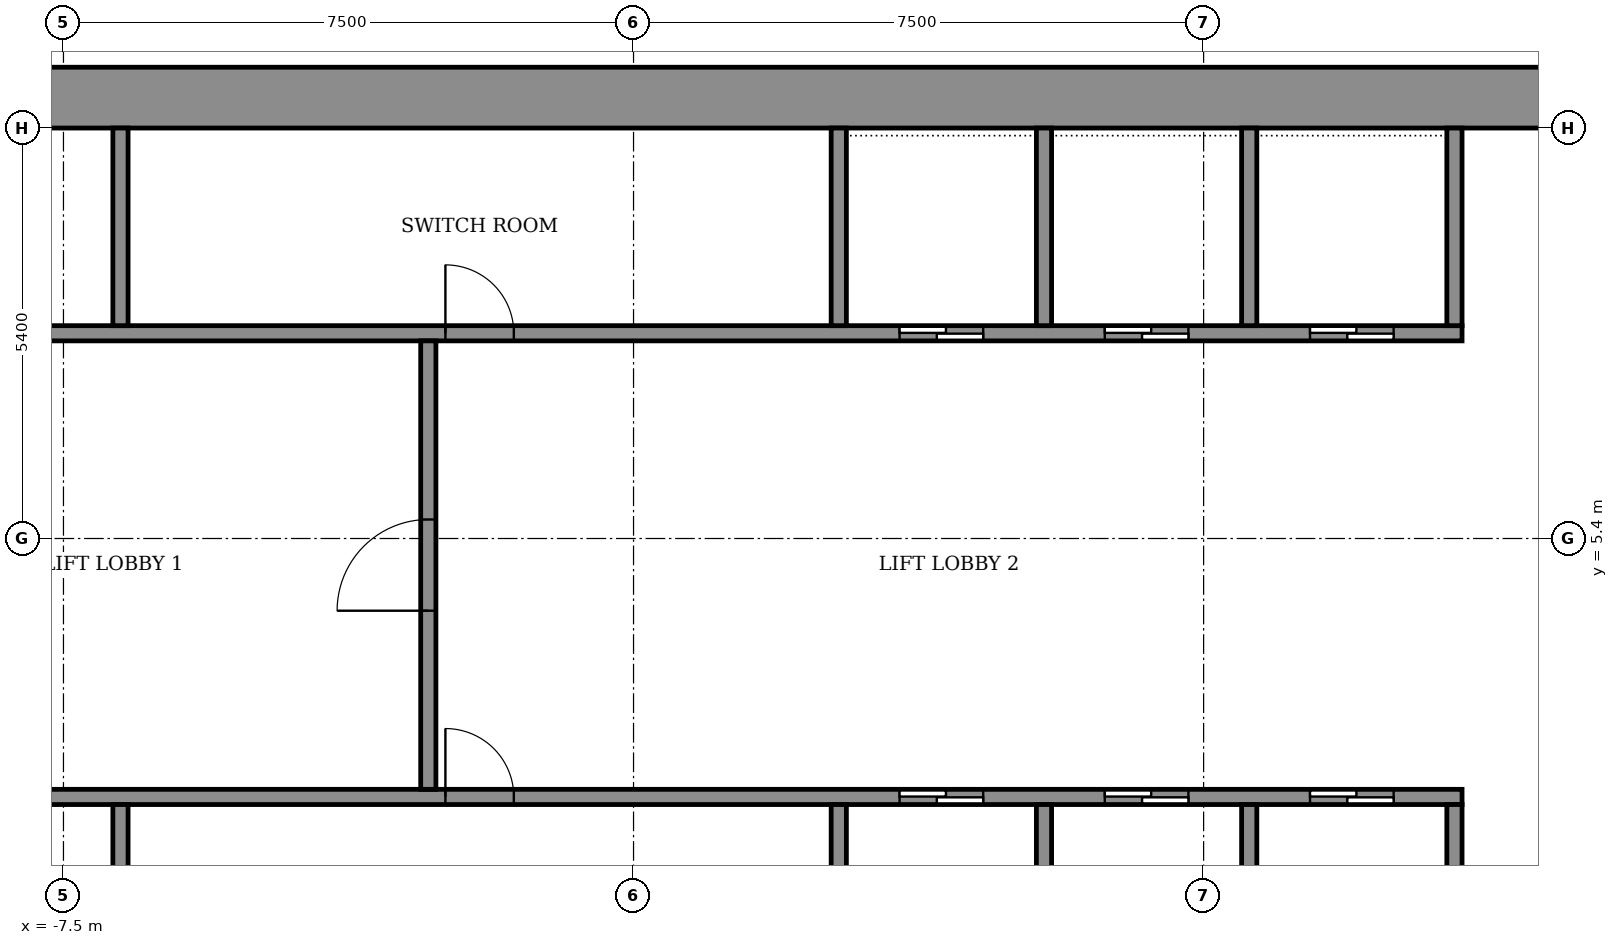
"""IFC4 building model, lengths in metres.
Left out: names, types, materials, properties, quantities, classifications, styles, units other than length and angle.
Written with IfcOpenShell. Run it as: python <this file> out.ifc"""

import sys

from ifc_helpers import new_model, si_unit, direction, frame, frame_2d, origin, place, context, subcontext, project, spatial, rectangle, extrude, element, fill, save


model = new_model("IFC4")
c1 = context("Model", 3, precision=1e-05, world=origin(), true_north=direction((0.0, 1.0)))
c2 = subcontext(c1, "Body", "Model", "MODEL_VIEW")
j1 = project(units=[si_unit("LENGTHUNIT", "METRE"), si_unit("PLANEANGLEUNIT", "RADIAN")], contexts=[c1])
p1 = place(None, origin())
s1 = spatial("IfcSite", under=j1, at=p1, CompositionType="ELEMENT")
p2 = place(p1, origin())
s2 = spatial("IfcBuilding", under=s1, at=p2, CompositionType="ELEMENT")
p3 = place(p2, frame((0.0, 0.0, 205.1)))
s3 = spatial("IfcBuildingStorey", under=s2, at=p3, CompositionType="ELEMENT", Elevation=205.1)
p4 = place(p3, frame((-14.6, 11.2, 0.0), z_axis=(0.0, 0.0, 1.0), x_axis=(1.0, 0.0, 0.0)))
e1 = element("IfcWall", 1, at=p4, inside=s3, PredefinedType="SHEAR", context=c2, shape_type="SweptSolid", body=[
    extrude(rectangle(XDim=29.2, YDim=0.8, at=frame_2d((14.6, 0.0))), origin(), (0.0, 0.0, 1.0), 3.6),
])
p5 = place(p3, frame((-10.9, 2.0, 0.0), z_axis=(0.0, 0.0, 1.0), x_axis=(1.0, 0.0, 0.0)))
e2 = element("IfcWall", 2, at=p5, inside=s3, PredefinedType="SHEAR", context=c2, shape_type="SweptSolid", body=[
    extrude(rectangle(XDim=21.8, YDim=0.2, at=frame_2d((10.9, 0.0))), origin(), (0.0, 0.0, 1.0), 3.05),
])
p6 = place(p5, frame((14.4, 0.0, 0.0)))
e3 = element("IfcOpeningElement", 3, at=p6, cuts=e2, PredefinedType="OPENING", context=c2, shape_type="SweptSolid", body=[
    extrude(rectangle(XDim=1.1, YDim=2.1, at=frame_2d((0.55, 1.05))), frame((0.0, 0.11, 0.0), z_axis=(0.0, -1.0, 0.0), x_axis=(1.0, 0.0, 0.0)), (0.0, 0.0, 1.0), 0.22),
])
p7 = place(p5, frame((17.1, 0.0, 0.0)))
e4 = element("IfcOpeningElement", 4, at=p7, cuts=e2, PredefinedType="OPENING", context=c2, shape_type="SweptSolid", body=[
    extrude(rectangle(XDim=1.1, YDim=2.1, at=frame_2d((0.55, 1.05))), frame((0.0, 0.11, 0.0), z_axis=(0.0, -1.0, 0.0), x_axis=(1.0, 0.0, 0.0)), (0.0, 0.0, 1.0), 0.22),
])
p8 = place(p5, frame((19.8, 0.0, 0.0)))
e5 = element("IfcOpeningElement", 5, at=p8, cuts=e2, PredefinedType="OPENING", context=c2, shape_type="SweptSolid", body=[
    extrude(rectangle(XDim=1.1, YDim=2.1, at=frame_2d((0.55, 1.05))), frame((0.0, 0.11, 0.0), z_axis=(0.0, -1.0, 0.0), x_axis=(1.0, 0.0, 0.0)), (0.0, 0.0, 1.0), 0.22),
])
p9 = place(p5, frame((1.675, 0.0, 0.0)))
e6 = element("IfcOpeningElement", 6, at=p9, cuts=e2, PredefinedType="OPENING", context=c2, shape_type="SweptSolid", body=[
    extrude(rectangle(XDim=0.9, YDim=2.1, at=frame_2d((0.45, 1.05))), frame((0.0, 0.11, 0.0), z_axis=(0.0, -1.0, 0.0), x_axis=(1.0, 0.0, 0.0)), (0.0, 0.0, 1.0), 0.22),
])
p10 = place(p5, frame((8.425, 0.0, 0.0)))
e7 = element("IfcOpeningElement", 7, at=p10, cuts=e2, PredefinedType="OPENING", context=c2, shape_type="SweptSolid", body=[
    extrude(rectangle(XDim=0.9, YDim=2.1, at=frame_2d((0.45, 1.05))), frame((0.0, 0.11, 0.0), z_axis=(0.0, -1.0, 0.0), x_axis=(1.0, 0.0, 0.0)), (0.0, 0.0, 1.0), 0.22),
])
p11 = place(p3, frame((-10.9, 8.1, 0.0), z_axis=(0.0, 0.0, 1.0), x_axis=(1.0, 0.0, 0.0)))
e8 = element("IfcWall", 8, at=p11, inside=s3, PredefinedType="SHEAR", context=c2, shape_type="SweptSolid", body=[
    extrude(rectangle(XDim=21.8, YDim=0.2, at=frame_2d((10.9, 0.0))), origin(), (0.0, 0.0, 1.0), 3.05),
])
p12 = place(p11, frame((14.4, 0.0, 0.0)))
e9 = element("IfcOpeningElement", 9, at=p12, cuts=e8, PredefinedType="OPENING", context=c2, shape_type="SweptSolid", body=[
    extrude(rectangle(XDim=1.1, YDim=2.1, at=frame_2d((0.55, 1.05))), frame((0.0, 0.11, 0.0), z_axis=(0.0, -1.0, 0.0), x_axis=(1.0, 0.0, 0.0)), (0.0, 0.0, 1.0), 0.22),
])
p13 = place(p11, frame((17.1, 0.0, 0.0)))
e10 = element("IfcOpeningElement", 10, at=p13, cuts=e8, PredefinedType="OPENING", context=c2, shape_type="SweptSolid", body=[
    extrude(rectangle(XDim=1.1, YDim=2.1, at=frame_2d((0.55, 1.05))), frame((0.0, 0.11, 0.0), z_axis=(0.0, -1.0, 0.0), x_axis=(1.0, 0.0, 0.0)), (0.0, 0.0, 1.0), 0.22),
])
p14 = place(p11, frame((19.8, 0.0, 0.0)))
e11 = element("IfcOpeningElement", 11, at=p14, cuts=e8, PredefinedType="OPENING", context=c2, shape_type="SweptSolid", body=[
    extrude(rectangle(XDim=1.1, YDim=2.1, at=frame_2d((0.55, 1.05))), frame((0.0, 0.11, 0.0), z_axis=(0.0, -1.0, 0.0), x_axis=(1.0, 0.0, 0.0)), (0.0, 0.0, 1.0), 0.22),
])
p15 = place(p11, frame((1.675, 0.0, 0.0)))
e12 = element("IfcOpeningElement", 12, at=p15, cuts=e8, PredefinedType="OPENING", context=c2, shape_type="SweptSolid", body=[
    extrude(rectangle(XDim=0.9, YDim=2.1, at=frame_2d((0.45, 1.05))), frame((0.0, 0.11, 0.0), z_axis=(0.0, -1.0, 0.0), x_axis=(1.0, 0.0, 0.0)), (0.0, 0.0, 1.0), 0.22),
])
p16 = place(p11, frame((8.425, 0.0, 0.0)))
e13 = element("IfcOpeningElement", 13, at=p16, cuts=e8, PredefinedType="OPENING", context=c2, shape_type="SweptSolid", body=[
    extrude(rectangle(XDim=0.9, YDim=2.1, at=frame_2d((0.45, 1.05))), frame((0.0, 0.11, 0.0), z_axis=(0.0, -1.0, 0.0), x_axis=(1.0, 0.0, 0.0)), (0.0, 0.0, 1.0), 0.22),
])
p17 = place(p3, frame((-6.75, -0.6, 0.0), z_axis=(0.0, 0.0, 1.0), x_axis=(0.0, 1.0, 0.0)))
e14 = element("IfcWall", 14, at=p17, inside=s3, PredefinedType="STANDARD", context=c2, shape_type="SweptSolid", body=[
    extrude(rectangle(XDim=2.5, YDim=0.2, at=frame_2d((1.25, 0.0))), origin(), (0.0, 0.0, 1.0), 3.05),
])
for number, where, z_axis, x_axis in (
    (15, (2.7, -0.6, 0.0), (0.0, 0.0, 1.0), (0.0, 1.0, 0.0)),
    (16, (5.4, -0.6, 0.0), (0.0, 0.0, 1.0), (0.0, 1.0, 0.0)),
    (17, (8.1, -0.6, 0.0), (0.0, 0.0, 1.0), (0.0, 1.0, 0.0)),
    (18, (10.8, -0.6, 0.0), (0.0, 0.0, 1.0), (0.0, 1.0, 0.0)),
):
    element("IfcWall", number, at=place(p3, frame(where, z_axis=z_axis, x_axis=x_axis)), inside=s3, PredefinedType="SHEAR", context=c2, shape_type="SweptSolid", body=[
        extrude(rectangle(XDim=2.5, YDim=0.2, at=frame_2d((1.25, 0.0))), origin(), (0.0, 0.0, 1.0), 3.05),
    ])
p18 = place(p3, frame((-6.75, 8.2, 0.0), z_axis=(0.0, 0.0, 1.0), x_axis=(0.0, 1.0, 0.0)))
e19 = element("IfcWall", 19, at=p18, inside=s3, PredefinedType="STANDARD", context=c2, shape_type="SweptSolid", body=[
    extrude(rectangle(XDim=2.6, YDim=0.2, at=frame_2d((1.3, 0.0))), origin(), (0.0, 0.0, 1.0), 3.05),
])
for number, where, z_axis, x_axis in (
    (20, (2.7, 8.2, 0.0), (0.0, 0.0, 1.0), (0.0, 1.0, 0.0)),
    (21, (5.4, 8.2, 0.0), (0.0, 0.0, 1.0), (0.0, 1.0, 0.0)),
    (22, (8.1, 8.2, 0.0), (0.0, 0.0, 1.0), (0.0, 1.0, 0.0)),
    (23, (10.8, 8.2, 0.0), (0.0, 0.0, 1.0), (0.0, 1.0, 0.0)),
):
    element("IfcWall", number, at=place(p3, frame(where, z_axis=z_axis, x_axis=x_axis)), inside=s3, PredefinedType="SHEAR", context=c2, shape_type="SweptSolid", body=[
        extrude(rectangle(XDim=2.6, YDim=0.2, at=frame_2d((1.3, 0.0))), origin(), (0.0, 0.0, 1.0), 3.05),
    ])
p19 = place(p3, frame((-2.7, 2.1, 0.0), z_axis=(0.0, 0.0, 1.0), x_axis=(0.0, 1.0, 0.0)))
e24 = element("IfcWall", 24, at=p19, inside=s3, PredefinedType="STANDARD", context=c2, shape_type="SweptSolid", body=[
    extrude(rectangle(XDim=5.9, YDim=0.2, at=frame_2d((2.95, 0.0))), origin(), (0.0, 0.0, 1.0), 3.05),
])
p20 = place(p19, frame((2.35, 0.0, 0.0)))
e25 = element("IfcOpeningElement", 25, at=p20, cuts=e24, PredefinedType="OPENING", context=c2, shape_type="SweptSolid", body=[
    extrude(rectangle(XDim=1.2, YDim=2.1, at=frame_2d((0.6, 1.05))), frame((0.0, 0.11, 0.0), z_axis=(0.0, -1.0, 0.0), x_axis=(1.0, 0.0, 0.0)), (0.0, 0.0, 1.0), 0.22),
])
p21 = place(p6, origin())
e26 = element("IfcDoor", 26, at=p21, inside=s3, OperationType="SLIDING_TO_LEFT", PredefinedType="DOOR", context=c2, shape_type="SweptSolid", body=[
    extrude(rectangle(XDim=1.1, YDim=2.1, at=frame_2d((0.55, 1.05))), frame((0.0, 0.025, 0.0), z_axis=(0.0, -1.0, 0.0), x_axis=(1.0, 0.0, 0.0)), (0.0, 0.0, 1.0), 0.05),
])
fill(e3, e26)
p22 = place(p7, origin())
e27 = element("IfcDoor", 27, at=p22, inside=s3, OperationType="SLIDING_TO_LEFT", PredefinedType="DOOR", context=c2, shape_type="SweptSolid", body=[
    extrude(rectangle(XDim=1.1, YDim=2.1, at=frame_2d((0.55, 1.05))), frame((0.0, 0.025, 0.0), z_axis=(0.0, -1.0, 0.0), x_axis=(1.0, 0.0, 0.0)), (0.0, 0.0, 1.0), 0.05),
])
fill(e4, e27)
p23 = place(p8, origin())
e28 = element("IfcDoor", 28, at=p23, inside=s3, OperationType="SLIDING_TO_LEFT", PredefinedType="DOOR", context=c2, shape_type="SweptSolid", body=[
    extrude(rectangle(XDim=1.1, YDim=2.1, at=frame_2d((0.55, 1.05))), frame((0.0, 0.025, 0.0), z_axis=(0.0, -1.0, 0.0), x_axis=(1.0, 0.0, 0.0)), (0.0, 0.0, 1.0), 0.05),
])
fill(e5, e28)
p24 = place(p12, origin())
e29 = element("IfcDoor", 29, at=p24, inside=s3, OperationType="SLIDING_TO_LEFT", PredefinedType="DOOR", context=c2, shape_type="SweptSolid", body=[
    extrude(rectangle(XDim=1.1, YDim=2.1, at=frame_2d((0.55, 1.05))), frame((0.0, 0.025, 0.0), z_axis=(0.0, -1.0, 0.0), x_axis=(1.0, 0.0, 0.0)), (0.0, 0.0, 1.0), 0.05),
])
fill(e9, e29)
p25 = place(p13, origin())
e30 = element("IfcDoor", 30, at=p25, inside=s3, OperationType="SLIDING_TO_LEFT", PredefinedType="DOOR", context=c2, shape_type="SweptSolid", body=[
    extrude(rectangle(XDim=1.1, YDim=2.1, at=frame_2d((0.55, 1.05))), frame((0.0, 0.025, 0.0), z_axis=(0.0, -1.0, 0.0), x_axis=(1.0, 0.0, 0.0)), (0.0, 0.0, 1.0), 0.05),
])
fill(e10, e30)
p26 = place(p14, origin())
e31 = element("IfcDoor", 31, at=p26, inside=s3, OperationType="SLIDING_TO_LEFT", PredefinedType="DOOR", context=c2, shape_type="SweptSolid", body=[
    extrude(rectangle(XDim=1.1, YDim=2.1, at=frame_2d((0.55, 1.05))), frame((0.0, 0.025, 0.0), z_axis=(0.0, -1.0, 0.0), x_axis=(1.0, 0.0, 0.0)), (0.0, 0.0, 1.0), 0.05),
])
fill(e11, e31)
p27 = place(p10, origin())
e32 = element("IfcDoor", 32, at=p27, inside=s3, OperationType="SINGLE_SWING_LEFT", PredefinedType="DOOR", context=c2, shape_type="SweptSolid", body=[
    extrude(rectangle(XDim=0.9, YDim=2.1, at=frame_2d((0.45, 1.05))), frame((0.0, 0.025, 0.0), z_axis=(0.0, -1.0, 0.0), x_axis=(1.0, 0.0, 0.0)), (0.0, 0.0, 1.0), 0.05),
])
fill(e7, e32)
p28 = place(p16, origin())
e33 = element("IfcDoor", 33, at=p28, inside=s3, OperationType="SINGLE_SWING_LEFT", PredefinedType="DOOR", context=c2, shape_type="SweptSolid", body=[
    extrude(rectangle(XDim=0.9, YDim=2.1, at=frame_2d((0.45, 1.05))), frame((0.0, 0.025, 0.0), z_axis=(0.0, -1.0, 0.0), x_axis=(1.0, 0.0, 0.0)), (0.0, 0.0, 1.0), 0.05),
])
fill(e13, e33)
p29 = place(p20, origin())
e34 = element("IfcDoor", 34, at=p29, inside=s3, OperationType="SINGLE_SWING_LEFT", PredefinedType="DOOR", context=c2, shape_type="SweptSolid", body=[
    extrude(rectangle(XDim=1.2, YDim=2.1, at=frame_2d((0.6, 1.05))), frame((0.0, 0.025, 0.0), z_axis=(0.0, -1.0, 0.0), x_axis=(1.0, 0.0, 0.0)), (0.0, 0.0, 1.0), 0.05),
])
fill(e25, e34)
save(model, sys.argv[1])
